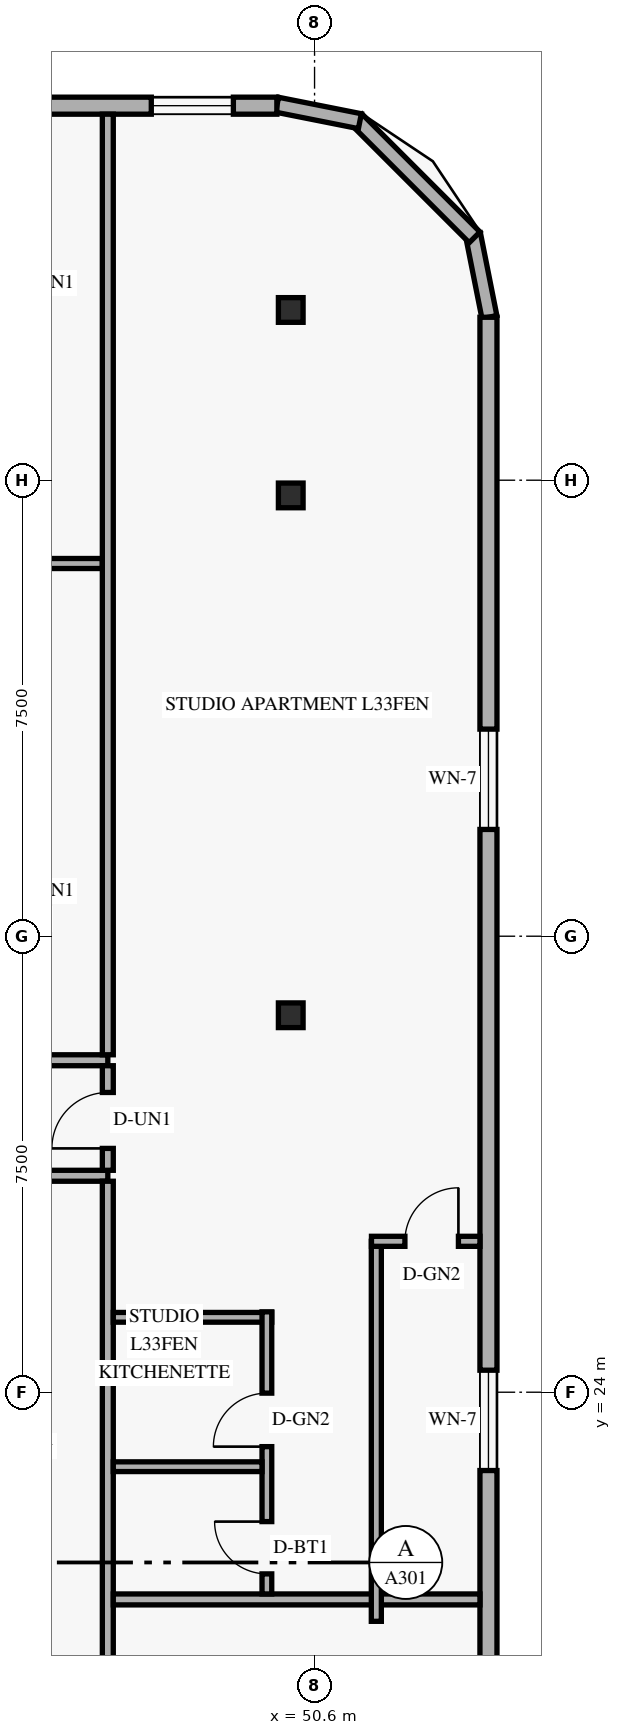
"""IFC4 building model, lengths in metres.
Left out: names, types, materials, properties, quantities, classifications, styles, units other than length and angle.
Written with IfcOpenShell. Run it as: python <this file> out.ifc"""

import sys

from ifc_helpers import new_model, si_unit, direction, frame, frame_2d, origin, origin_2d, place, context, subcontext, project, spatial, rectangle, hollow_rectangle, extrude, element, fill, save


model = new_model("IFC4")
c1 = context("Model", 3, precision=1e-05, world=origin(), true_north=direction((0.0, 1.0)))
c2 = subcontext(c1, "Body", "Model", "MODEL_VIEW")
j1 = project(units=[si_unit("LENGTHUNIT", "METRE"), si_unit("PLANEANGLEUNIT", "RADIAN")], contexts=[c1])
p1 = place(None, origin())
s1 = spatial("IfcSite", under=j1, at=p1, CompositionType="ELEMENT")
p2 = place(p1, origin())
s2 = spatial("IfcBuilding", under=s1, at=p2, CompositionType="ELEMENT")
p3 = place(p2, frame((0.0, 0.0, 128.4)))
s3 = spatial("IfcBuildingStorey", under=s2, at=p3, CompositionType="ELEMENT", Elevation=128.4)
for number, where, z_axis, x_axis in (
    (1, (50.104, 30.2, 0.0), (0.058, 0.0, 0.998), (0.0, 1.0, 0.0)),
    (2, (50.104, 38.75, 0.0), (0.058, 0.0, 0.998), (0.0, 1.0, 0.0)),
    (3, (50.104, 41.8, 0.0), (0.058, 0.0, 0.998), (0.0, 1.0, 0.0)),
):
    element("IfcColumn", number, at=place(p3, frame(where, z_axis=z_axis, x_axis=x_axis)), inside=s3, PredefinedType="COLUMN", context=c2, shape_type="SweptSolid", body=[
        extrude(hollow_rectangle(XDim=0.406, YDim=0.406, WallThickness=0.016, at=origin_2d()), origin(), (0.0, 0.0, 1.0), 3.606),
    ])
p4 = place(p3, frame((53.476, 41.684, 0.0), z_axis=(0.0, 0.0, 1.0), x_axis=(-0.195000137217, 0.980803214965, 0.0)))
e4 = element("IfcWall", 4, at=p4, inside=s3, PredefinedType="SOLIDWALL", context=c2, shape_type="SweptSolid", body=[
    extrude(rectangle(XDim=1.388, YDim=0.25, at=frame_2d((0.694, 0.0))), origin(), (0.0, 0.0, 1.0), 3.36),
])
p5 = place(p3, frame((53.232, 42.995, 0.0), z_axis=(0.0, 0.0, 1.0), x_axis=(-0.707151344399, 0.707062215165, 0.0)))
e5 = element("IfcWall", 5, at=p5, inside=s3, PredefinedType="SOLIDWALL", context=c2, shape_type="SweptSolid", body=[
    extrude(rectangle(XDim=2.739, YDim=0.25, at=frame_2d((1.37, 0.0))), origin(), (0.0, 0.0, 1.0), 3.36),
])
p6 = place(p3, frame((51.345, 44.905, 0.0), z_axis=(0.0, 0.0, 1.0), x_axis=(-0.980809899341, 0.19496651342, 0.0)))
e6 = element("IfcWall", 6, at=p6, inside=s3, PredefinedType="SOLIDWALL", context=c2, shape_type="SweptSolid", body=[
    extrude(rectangle(XDim=1.389, YDim=0.25, at=frame_2d((0.694, 0.0))), origin(), (0.0, 0.0, 1.0), 3.36),
])
p7 = place(p3, frame((53.46, 6.32, 0.0), z_axis=(0.0, 0.0, 1.0), x_axis=(0.0, 1.0, 0.0)))
e7 = element("IfcWall", 7, at=p7, inside=s3, PredefinedType="SOLIDWALL", context=c2, shape_type="SweptSolid", body=[
    extrude(rectangle(XDim=35.36, YDim=0.28, at=frame_2d((17.68, 0.0))), origin(), (0.0, 0.0, 1.0), 3.36),
])
p8 = place(p7, frame((6.311, 0.0, 0.85)))
e8 = element("IfcOpeningElement", 8, at=p8, cuts=e7, PredefinedType="OPENING", context=c2, shape_type="SweptSolid", body=[
    extrude(rectangle(XDim=1.65, YDim=1.6, at=frame_2d((0.825, 0.8))), frame((0.0, 0.15, 0.0), z_axis=(0.0, -1.0, 0.0), x_axis=(1.0, 0.0, 0.0)), (0.0, 0.0, 1.0), 0.3),
])
p9 = place(p7, frame((16.392, 0.0, 0.85)))
e9 = element("IfcOpeningElement", 9, at=p9, cuts=e7, PredefinedType="OPENING", context=c2, shape_type="SweptSolid", body=[
    extrude(rectangle(XDim=1.65, YDim=1.6, at=frame_2d((0.825, 0.8))), frame((0.0, 0.15, 0.0), z_axis=(0.0, -1.0, 0.0), x_axis=(1.0, 0.0, 0.0)), (0.0, 0.0, 1.0), 0.3),
])
p10 = place(p7, frame((26.936, 0.0, 0.85)))
e10 = element("IfcOpeningElement", 10, at=p10, cuts=e7, PredefinedType="OPENING", context=c2, shape_type="SweptSolid", body=[
    extrude(rectangle(XDim=1.65, YDim=1.6, at=frame_2d((0.825, 0.8))), frame((0.0, 0.15, 0.0), z_axis=(0.0, -1.0, 0.0), x_axis=(1.0, 0.0, 0.0)), (0.0, 0.0, 1.0), 0.3),
])
p11 = place(p3, frame((49.98, 45.16, 0.0), z_axis=(0.0, 0.0, 1.0), x_axis=(-1.0, 0.0, 0.0)))
e11 = element("IfcWall", 11, at=p11, inside=s3, PredefinedType="SOLIDWALL", context=c2, shape_type="SweptSolid", body=[
    extrude(rectangle(XDim=36.56, YDim=0.28, at=frame_2d((18.28, 0.0))), origin(), (0.0, 0.0, 1.0), 3.36),
])
p12 = place(p11, frame((31.77, 0.0, 0.85)))
e12 = element("IfcOpeningElement", 12, at=p12, cuts=e11, PredefinedType="OPENING", context=c2, shape_type="SweptSolid", body=[
    extrude(rectangle(XDim=1.35, YDim=1.55, at=frame_2d((0.675, 0.775))), frame((0.0, 0.15, 0.0), z_axis=(0.0, -1.0, 0.0), x_axis=(1.0, 0.0, 0.0)), (0.0, 0.0, 1.0), 0.3),
])
p13 = place(p11, frame((23.28, 0.0, 0.85)))
e13 = element("IfcOpeningElement", 13, at=p13, cuts=e11, PredefinedType="OPENING", context=c2, shape_type="SweptSolid", body=[
    extrude(rectangle(XDim=1.35, YDim=1.55, at=frame_2d((0.675, 0.775))), frame((0.0, 0.15, 0.0), z_axis=(0.0, -1.0, 0.0), x_axis=(1.0, 0.0, 0.0)), (0.0, 0.0, 1.0), 0.3),
])
p14 = place(p11, frame((16.395, 0.0, 0.85)))
e14 = element("IfcOpeningElement", 14, at=p14, cuts=e11, PredefinedType="OPENING", context=c2, shape_type="SweptSolid", body=[
    extrude(rectangle(XDim=1.35, YDim=1.55, at=frame_2d((0.675, 0.775))), frame((0.0, 0.15, 0.0), z_axis=(0.0, -1.0, 0.0), x_axis=(1.0, 0.0, 0.0)), (0.0, 0.0, 1.0), 0.3),
])
p15 = place(p11, frame((10.49, 0.0, 0.85)))
e15 = element("IfcOpeningElement", 15, at=p15, cuts=e11, PredefinedType="OPENING", context=c2, shape_type="SweptSolid", body=[
    extrude(rectangle(XDim=1.35, YDim=1.55, at=frame_2d((0.675, 0.775))), frame((0.0, 0.15, 0.0), z_axis=(0.0, -1.0, 0.0), x_axis=(1.0, 0.0, 0.0)), (0.0, 0.0, 1.0), 0.3),
])
p16 = place(p11, frame((4.6, 0.0, 0.85)))
e16 = element("IfcOpeningElement", 16, at=p16, cuts=e11, PredefinedType="OPENING", context=c2, shape_type="SweptSolid", body=[
    extrude(rectangle(XDim=1.35, YDim=1.55, at=frame_2d((0.675, 0.775))), frame((0.0, 0.15, 0.0), z_axis=(0.0, -1.0, 0.0), x_axis=(1.0, 0.0, 0.0)), (0.0, 0.0, 1.0), 0.3),
])
p17 = place(p11, frame((0.715, 0.0, 0.85)))
e17 = element("IfcOpeningElement", 17, at=p17, cuts=e11, PredefinedType="OPENING", context=c2, shape_type="SweptSolid", body=[
    extrude(rectangle(XDim=1.35, YDim=1.55, at=frame_2d((0.675, 0.775))), frame((0.0, 0.15, 0.0), z_axis=(0.0, -1.0, 0.0), x_axis=(1.0, 0.0, 0.0)), (0.0, 0.0, 1.0), 0.3),
])
p18 = place(p3, frame((37.64, 27.56, 0.0), z_axis=(0.0, 0.0, 1.0), x_axis=(1.0, 0.0, 0.0)))
e18 = element("IfcWall", 18, at=p18, inside=s3, PredefinedType="STANDARD", context=c2, shape_type="SweptSolid", body=[
    extrude(rectangle(XDim=9.56, YDim=0.18, at=frame_2d((4.78, 0.0))), origin(), (0.0, 0.0, 1.0), 2.731),
])
p19 = place(p3, frame((35.51, 29.46, 0.0), z_axis=(0.0, 0.0, 1.0), x_axis=(1.0, 0.0, 0.0)))
e19 = element("IfcWall", 19, at=p19, inside=s3, PredefinedType="STANDARD", context=c2, shape_type="SweptSolid", body=[
    extrude(rectangle(XDim=11.69, YDim=0.18, at=frame_2d((5.845, 0.0))), origin(), (0.0, 0.0, 1.0), 2.731),
])
p20 = place(p19, frame((0.32, 0.0, 0.0)))
e20 = element("IfcOpeningElement", 20, at=p20, cuts=e19, PredefinedType="OPENING", context=c2, shape_type="SweptSolid", body=[
    extrude(rectangle(XDim=0.92, YDim=2.15, at=frame_2d((0.46, 1.075))), frame((0.0, 0.1, 0.0), z_axis=(0.0, -1.0, 0.0), x_axis=(1.0, 0.0, 0.0)), (0.0, 0.0, 1.0), 0.2),
])
p21 = place(p3, frame((42.29, 37.63, 0.0), z_axis=(0.0, 0.0, 1.0), x_axis=(1.0, 0.0, 0.0)))
e21 = element("IfcWall", 21, at=p21, inside=s3, PredefinedType="PARTITIONING", context=c2, shape_type="SweptSolid", body=[
    extrude(rectangle(XDim=4.82, YDim=0.165, at=frame_2d((2.41, 0.0))), origin(), (0.0, 0.0, 1.0), 2.731),
])
p22 = place(p3, frame((47.2, 27.65, 0.0), z_axis=(0.0, 0.0, 1.0), x_axis=(0.0, 1.0, 0.0)))
e22 = element("IfcWall", 22, at=p22, inside=s3, PredefinedType="STANDARD", context=c2, shape_type="SweptSolid", body=[
    extrude(rectangle(XDim=1.72, YDim=0.18, at=frame_2d((0.86, 0.0))), origin(), (0.0, 0.0, 1.0), 3.36),
])
p23 = place(p22, frame((0.36, 0.0, 0.0)))
e23 = element("IfcOpeningElement", 23, at=p23, cuts=e22, PredefinedType="OPENING", context=c2, shape_type="SweptSolid", body=[
    extrude(rectangle(XDim=0.92, YDim=2.15, at=frame_2d((0.46, 1.075))), frame((0.0, 0.1, 0.0), z_axis=(0.0, -1.0, 0.0), x_axis=(1.0, 0.0, 0.0)), (0.0, 0.0, 1.0), 0.2),
])
p24 = place(p3, frame((47.2, 17.37, 0.0), z_axis=(0.0, 0.0, 1.0), x_axis=(0.0, 1.0, 0.0)))
e24 = element("IfcWall", 24, at=p24, inside=s3, PredefinedType="PARTITIONING", context=c2, shape_type="SweptSolid", body=[
    extrude(rectangle(XDim=10.1, YDim=0.18, at=frame_2d((5.05, 0.0))), origin(), (0.0, 0.0, 1.0), 2.731),
])
p25 = place(p3, frame((47.2, 29.55, 0.0), z_axis=(0.0, 0.0, 1.0), x_axis=(0.0, 1.0, 0.0)))
e25 = element("IfcWall", 25, at=p25, inside=s3, PredefinedType="PARTITIONING", context=c2, shape_type="SweptSolid", body=[
    extrude(rectangle(XDim=15.47, YDim=0.18, at=frame_2d((7.735, 0.0))), origin(), (0.0, 0.0, 1.0), 2.731),
])
p26 = place(p3, frame((47.29, 20.592, 0.0), z_axis=(0.0, 0.0, 1.0), x_axis=(1.0, 0.0, 0.0)))
e26 = element("IfcWall", 26, at=p26, inside=s3, PredefinedType="PARTITIONING", context=c2, shape_type="SweptSolid", body=[
    extrude(rectangle(XDim=6.03, YDim=0.18, at=frame_2d((3.015, 0.0))), origin(), (0.0, 0.0, 1.0), 2.809),
])
p27 = place(p3, frame((47.29, 25.232, 0.0), z_axis=(0.0, 0.0, 1.0), x_axis=(1.0, 0.0, 0.0)))
e27 = element("IfcWall", 27, at=p27, inside=s3, PredefinedType="PLUMBINGWALL", context=c2, shape_type="SweptSolid", body=[
    extrude(rectangle(XDim=2.606, YDim=0.16, at=frame_2d((1.303, 0.0))), origin(), (0.0, 0.0, 1.0), 3.36),
])
p28 = place(p3, frame((49.816, 20.682, 0.0), z_axis=(0.0, 0.0, 1.0), x_axis=(0.0, 1.0, 0.0)))
e28 = element("IfcWall", 28, at=p28, inside=s3, PredefinedType="PLUMBINGWALL", context=c2, shape_type="SweptSolid", body=[
    extrude(rectangle(XDim=4.64, YDim=0.16, at=frame_2d((2.32, 0.0))), origin(), (0.0, 0.0, 1.0), 3.36),
])
p29 = place(p28, frame((0.33, 0.0, 0.0)))
e29 = element("IfcOpeningElement", 29, at=p29, cuts=e28, PredefinedType="OPENING", context=c2, shape_type="SweptSolid", body=[
    extrude(rectangle(XDim=0.86, YDim=2.12, at=frame_2d((0.43, 1.06))), frame((0.0, 0.09, 0.0), z_axis=(0.0, -1.0, 0.0), x_axis=(1.0, 0.0, 0.0)), (0.0, 0.0, 1.0), 0.18),
])
p30 = place(p28, frame((2.423, 0.0, 0.0)))
e30 = element("IfcOpeningElement", 30, at=p30, cuts=e28, PredefinedType="OPENING", context=c2, shape_type="SweptSolid", body=[
    extrude(rectangle(XDim=0.88, YDim=2.12, at=frame_2d((0.44, 1.06))), frame((0.0, 0.09, 0.0), z_axis=(0.0, -1.0, 0.0), x_axis=(1.0, 0.0, 0.0)), (0.0, 0.0, 1.0), 0.18),
])
p31 = place(p3, frame((47.29, 22.775, 0.0), z_axis=(0.0, 0.0, 1.0), x_axis=(1.0, 0.0, 0.0)))
e31 = element("IfcWall", 31, at=p31, inside=s3, PredefinedType="PLUMBINGWALL", context=c2, shape_type="SweptSolid", body=[
    extrude(rectangle(XDim=2.446, YDim=0.16, at=frame_2d((1.223, 0.0))), origin(), (0.0, 0.0, 1.0), 3.36),
])
p32 = place(p3, frame((51.616, 20.232, 0.0), z_axis=(0.0, 0.0, 1.0), x_axis=(0.0, 1.0, 0.0)))
e32 = element("IfcWall", 32, at=p32, inside=s3, PredefinedType="PARTITIONING", context=c2, shape_type="SweptSolid", body=[
    extrude(rectangle(XDim=6.25, YDim=0.165, at=frame_2d((3.125, 0.0))), origin(), (0.0, 0.0, 1.0), 3.36),
])
p33 = place(p3, frame((51.536, 26.482, 0.0), z_axis=(0.0, 0.0, 1.0), x_axis=(1.0, 0.0, 0.0)))
e33 = element("IfcWall", 33, at=p33, inside=s3, PredefinedType="PARTITIONING", context=c2, shape_type="SweptSolid", body=[
    extrude(rectangle(XDim=1.784, YDim=0.165, at=frame_2d((0.892, 0.0))), origin(), (0.0, 0.0, 1.0), 3.36),
])
p34 = place(p33, frame((0.55, 0.0, 0.0)))
e34 = element("IfcOpeningElement", 34, at=p34, cuts=e33, PredefinedType="OPENING", context=c2, shape_type="SweptSolid", body=[
    extrude(rectangle(XDim=0.88, YDim=2.12, at=frame_2d((0.44, 1.06))), frame((0.0, 0.093, 0.0), z_axis=(0.0, -1.0, 0.0), x_axis=(1.0, 0.0, 0.0)), (0.0, 0.0, 1.0), 0.185),
])
p35 = place(p9, origin())
e35 = element("IfcWindow", 35, at=p35, inside=s3, PartitioningType="SINGLE_PANEL", PredefinedType="WINDOW", context=c2, shape_type="SweptSolid", body=[
    extrude(rectangle(XDim=1.65, YDim=1.6, at=frame_2d((0.825, 0.8))), frame((0.0, 0.03, 0.0), z_axis=(0.0, -1.0, 0.0), x_axis=(1.0, 0.0, 0.0)), (0.0, 0.0, 1.0), 0.06),
])
fill(e9, e35)
p36 = place(p10, origin())
e36 = element("IfcWindow", 36, at=p36, inside=s3, PartitioningType="SINGLE_PANEL", PredefinedType="WINDOW", context=c2, shape_type="SweptSolid", body=[
    extrude(rectangle(XDim=1.65, YDim=1.6, at=frame_2d((0.825, 0.8))), frame((0.0, 0.03, 0.0), z_axis=(0.0, -1.0, 0.0), x_axis=(1.0, 0.0, 0.0)), (0.0, 0.0, 1.0), 0.06),
])
fill(e10, e36)
p37 = place(p17, origin())
e37 = element("IfcWindow", 37, at=p37, inside=s3, PartitioningType="SINGLE_PANEL", PredefinedType="WINDOW", context=c2, shape_type="SweptSolid", body=[
    extrude(rectangle(XDim=1.35, YDim=1.55, at=frame_2d((0.675, 0.775))), frame((0.0, 0.03, 0.0), z_axis=(0.0, -1.0, 0.0), x_axis=(1.0, 0.0, 0.0)), (0.0, 0.0, 1.0), 0.06),
])
fill(e17, e37)
p38 = place(p34, origin())
e38 = element("IfcDoor", 38, at=p38, inside=s3, OperationType="SINGLE_SWING_RIGHT", PredefinedType="DOOR", context=c2, shape_type="SweptSolid", body=[
    extrude(rectangle(XDim=0.88, YDim=2.12, at=frame_2d((0.44, 1.06))), frame((0.0, 0.025, 0.0), z_axis=(0.0, -1.0, 0.0), x_axis=(1.0, 0.0, 0.0)), (0.0, 0.0, 1.0), 0.05),
])
fill(e34, e38)
p39 = place(p23, origin())
e39 = element("IfcDoor", 39, at=p39, inside=s3, OperationType="SINGLE_SWING_LEFT", PredefinedType="DOOR", context=c2, shape_type="SweptSolid", body=[
    extrude(rectangle(XDim=0.92, YDim=2.15, at=frame_2d((0.46, 1.075))), frame((0.0, 0.025, 0.0), z_axis=(0.0, -1.0, 0.0), x_axis=(1.0, 0.0, 0.0)), (0.0, 0.0, 1.0), 0.05),
])
fill(e23, e39)
p40 = place(p29, origin())
e40 = element("IfcDoor", 40, at=p40, inside=s3, OperationType="SINGLE_SWING_RIGHT", PredefinedType="DOOR", context=c2, shape_type="SweptSolid", body=[
    extrude(rectangle(XDim=0.86, YDim=2.12, at=frame_2d((0.43, 1.06))), frame((0.0, 0.025, 0.0), z_axis=(0.0, -1.0, 0.0), x_axis=(1.0, 0.0, 0.0)), (0.0, 0.0, 1.0), 0.05),
])
fill(e29, e40)
p41 = place(p30, origin())
e41 = element("IfcDoor", 41, at=p41, inside=s3, OperationType="SINGLE_SWING_LEFT", PredefinedType="DOOR", context=c2, shape_type="SweptSolid", body=[
    extrude(rectangle(XDim=0.88, YDim=2.12, at=frame_2d((0.44, 1.06))), frame((0.0, 0.025, 0.0), z_axis=(0.0, -1.0, 0.0), x_axis=(1.0, 0.0, 0.0)), (0.0, 0.0, 1.0), 0.05),
])
fill(e30, e41)
save(model, sys.argv[1])
